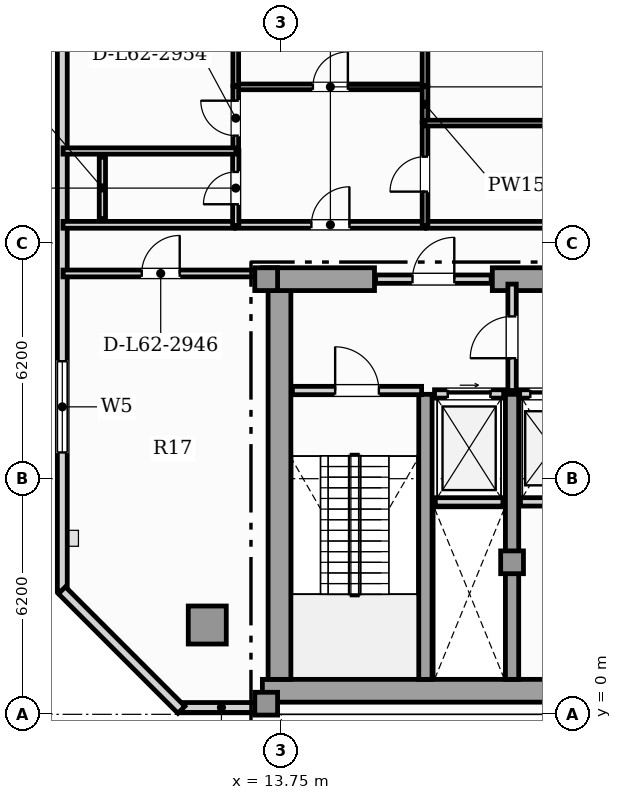
"""IFC4 building model, lengths in metres.
Left out: names, types, materials, properties, quantities, classifications, styles, units other than length and angle.
Written with IfcOpenShell. Run it as: python <this file> out.ifc"""

import sys

from ifc_helpers import new_model, si_unit, direction, frame, frame_2d, origin, origin_2d, place, context, subcontext, project, spatial, rectangle, hollow_rectangle, extrude, element, fill, save


model = new_model("IFC4")
c1 = context("Model", 3, precision=1e-05, world=origin(), true_north=direction((0.0, 1.0)))
c2 = subcontext(c1, "Body", "Model", "MODEL_VIEW")
j1 = project(units=[si_unit("LENGTHUNIT", "METRE"), si_unit("PLANEANGLEUNIT", "RADIAN")], contexts=[c1])
p1 = place(None, origin())
s1 = spatial("IfcSite", under=j1, at=p1, CompositionType="ELEMENT")
p2 = place(p1, origin())
s2 = spatial("IfcBuilding", under=s1, at=p2, CompositionType="ELEMENT")
p3 = place(p2, frame((0.0, 0.0, 251.7)))
s3 = spatial("IfcBuildingStorey", under=s2, at=p3, CompositionType="ELEMENT", Elevation=251.7)
p4 = place(p3, frame((13.25, 0.62, 0.0), z_axis=(0.0, 0.0, 1.0), x_axis=(1.0, 0.0, 0.0)))
e1 = element("IfcWall", 1, at=p4, inside=s3, PredefinedType="SHEAR", context=c2, shape_type="SweptSolid", body=[
    extrude(rectangle(XDim=31.0, YDim=0.6, at=frame_2d((15.5, 0.0))), origin(), (0.0, 0.0, 1.0), 4.85),
])
p5 = place(p3, frame((13.7, 0.92, 0.0), z_axis=(0.0, 0.0, 1.0), x_axis=(0.0, 1.0, 0.0)))
e2 = element("IfcWall", 2, at=p5, inside=s3, PredefinedType="SHEAR", context=c2, shape_type="SweptSolid", body=[
    extrude(rectangle(XDim=10.53, YDim=0.6, at=frame_2d((5.265, 0.0))), origin(), (0.0, 0.0, 1.0), 4.85),
])
p6 = place(p3, frame((13.25, 11.45, 0.0), z_axis=(0.0, 0.0, 1.0), x_axis=(1.0, 0.0, 0.0)))
e3 = element("IfcWall", 3, at=p6, inside=s3, PredefinedType="SHEAR", context=c2, shape_type="SweptSolid", body=[
    extrude(rectangle(XDim=2.95, YDim=0.6, at=frame_2d((1.475, 0.0))), origin(), (0.0, 0.0, 1.0), 4.85),
])
p7 = place(p3, frame((19.3, 11.45, 0.0), z_axis=(0.0, 0.0, 1.0), x_axis=(1.0, 0.0, 0.0)))
e4 = element("IfcWall", 4, at=p7, inside=s3, PredefinedType="SHEAR", context=c2, shape_type="SweptSolid", body=[
    extrude(rectangle(XDim=7.3, YDim=0.6, at=frame_2d((3.65, 0.0))), origin(), (0.0, 0.0, 1.0), 4.85),
])
for number, where, z_axis, x_axis in (
    (5, (17.54, 0.92, 0.0), (0.0, 0.0, 1.0), (0.0, 1.0, 0.0)),
    (6, (19.82, 0.92, 0.0), (0.0, 0.0, 1.0), (0.0, 1.0, 0.0)),
):
    element("IfcWall", number, at=place(p3, frame(where, z_axis=z_axis, x_axis=x_axis)), inside=s3, PredefinedType="SHEAR", context=c2, shape_type="SweptSolid", body=[
        extrude(rectangle(XDim=7.5, YDim=0.35, at=frame_2d((3.75, 0.0))), origin(), (0.0, 0.0, 1.0), 4.85),
    ])
for number, where, z_axis, x_axis in (
    (7, (13.35, 0.28, 0.0), (0.0, 0.0, 1.0), (1.0, 0.0, 0.0)),
    (8, (13.35, 11.45, 0.0), (0.0, 0.0, 1.0), (1.0, 0.0, 0.0)),
    (9, (19.82, 4.0, 0.0), (0.0, 0.0, 1.0), (1.0, 0.0, 0.0)),
):
    element("IfcColumn", number, at=place(p3, frame(where, z_axis=z_axis, x_axis=x_axis)), inside=s3, PredefinedType="COLUMN", context=c2, shape_type="SweptSolid", body=[
        extrude(rectangle(XDim=0.6, YDim=0.6, at=origin_2d()), origin(), (0.0, 0.0, 1.0), 5.05),
    ])
p8 = place(p3, frame((11.8, 2.35, 0.0), z_axis=(0.0, 0.0, 1.0), x_axis=(1.0, 0.0, 0.0)))
e10 = element("IfcColumn", 10, at=p8, inside=s3, PredefinedType="USERDEFINED", context=c2, shape_type="SweptSolid", body=[
    extrude(hollow_rectangle(XDim=1.0, YDim=1.0, WallThickness=0.06, at=origin_2d()), origin(), (0.0, 0.0, 1.0), 5.05),
])
p9 = place(p3, frame((11.095, 0.18, 0.0), z_axis=(0.0, 0.0, 1.0), x_axis=(1.0, 0.0, 0.0)))
e11 = element("IfcWall", 11, at=p9, inside=s3, PredefinedType="SOLIDWALL", context=c2, shape_type="SweptSolid", body=[
    extrude(rectangle(XDim=2.155, YDim=0.26, at=frame_2d((1.077, 0.0))), origin(), (0.0, 0.0, 1.0), 4.85),
])
p10 = place(p3, frame((7.986, 32.932, 0.0), z_axis=(0.0, 0.0, 1.0), x_axis=(0.0, -1.0, 0.0)))
e12 = element("IfcWall", 12, at=p10, inside=s3, PredefinedType="SOLIDWALL", context=c2, shape_type="SweptSolid", body=[
    extrude(rectangle(XDim=29.692, YDim=0.26, at=frame_2d((14.846, 0.0))), origin(), (0.0, 0.0, 1.0), 4.85),
])
p11 = place(p10, frame((23.642, 0.0, 0.85)))
e13 = element("IfcOpeningElement", 13, at=p11, cuts=e12, PredefinedType="OPENING", context=c2, shape_type="SweptSolid", body=[
    extrude(rectangle(XDim=2.4, YDim=2.0, at=frame_2d((1.2, 1.0))), frame((0.0, 0.14, 0.0), z_axis=(0.0, -1.0, 0.0), x_axis=(1.0, 0.0, 0.0)), (0.0, 0.0, 1.0), 0.28),
])
p12 = place(p10, frame((4.732, 0.0, 0.95)))
e14 = element("IfcOpeningElement", 14, at=p12, cuts=e12, PredefinedType="OPENING", context=c2, shape_type="SweptSolid", body=[
    extrude(rectangle(XDim=0.9, YDim=1.5, at=frame_2d((0.45, 0.75))), frame((0.0, 0.14, 0.0), z_axis=(0.0, -1.0, 0.0), x_axis=(1.0, 0.0, 0.0)), (0.0, 0.0, 1.0), 0.28),
])
p13 = place(p10, frame((11.271, 0.0, 0.9)))
e15 = element("IfcOpeningElement", 15, at=p13, cuts=e12, PredefinedType="OPENING", context=c2, shape_type="SweptSolid", body=[
    extrude(rectangle(XDim=1.5, YDim=1.95, at=frame_2d((0.75, 0.975))), frame((0.0, 0.14, 0.0), z_axis=(0.0, -1.0, 0.0), x_axis=(1.0, 0.0, 0.0)), (0.0, 0.0, 1.0), 0.28),
])
p14 = place(p3, frame((7.976, 3.264, 0.0), z_axis=(0.0, 0.0, 1.0), x_axis=(0.707106781187, -0.707106781187, 0.0)))
e16 = element("IfcWall", 16, at=p14, inside=s3, PredefinedType="SOLIDWALL", context=c2, shape_type="SweptSolid", body=[
    extrude(rectangle(XDim=4.446, YDim=0.26, at=frame_2d((2.223, 0.0))), origin(), (0.0, 0.0, 1.0), 4.85),
])
p15 = place(p3, frame((17.8, 5.59, 0.0), z_axis=(0.0, 0.0, 1.0), x_axis=(1.0, 0.0, 0.0)))
e17 = element("IfcWall", 17, at=p15, inside=s3, PredefinedType="SOLIDWALL", context=c2, shape_type="SweptSolid", body=[
    extrude(rectangle(XDim=1.78, YDim=0.22, at=frame_2d((0.89, 0.0))), origin(), (0.0, 0.0, 1.0), 4.85),
])
p16 = place(p3, frame((17.78, 8.43, 0.0), z_axis=(0.0, 0.0, 1.0), x_axis=(1.0, 0.0, 0.0)))
e18 = element("IfcWall", 18, at=p16, inside=s3, PredefinedType="SOLIDWALL", context=c2, shape_type="SweptSolid", body=[
    extrude(rectangle(XDim=1.82, YDim=0.22, at=frame_2d((0.91, 0.0))), origin(), (0.0, 0.0, 1.0), 4.85),
])
p17 = place(p16, frame((0.35, 0.0, 0.0)))
e19 = element("IfcOpeningElement", 19, at=p17, cuts=e18, PredefinedType="OPENING", context=c2, shape_type="SweptSolid", body=[
    extrude(rectangle(XDim=1.12, YDim=2.25, at=frame_2d((0.56, 1.125))), frame((0.0, 0.12, 0.0), z_axis=(0.0, -1.0, 0.0), x_axis=(1.0, 0.0, 0.0)), (0.0, 0.0, 1.0), 0.24),
])
p18 = place(p3, frame((20.04, 5.59, 0.0), z_axis=(0.0, 0.0, 1.0), x_axis=(1.0, 0.0, 0.0)))
e20 = element("IfcWall", 20, at=p18, inside=s3, PredefinedType="SOLIDWALL", context=c2, shape_type="SweptSolid", body=[
    extrude(rectangle(XDim=1.7, YDim=0.22, at=frame_2d((0.85, 0.0))), origin(), (0.0, 0.0, 1.0), 4.85),
])
p19 = place(p3, frame((20.02, 8.43, 0.0), z_axis=(0.0, 0.0, 1.0), x_axis=(1.0, 0.0, 0.0)))
e21 = element("IfcWall", 21, at=p19, inside=s3, PredefinedType="SOLIDWALL", context=c2, shape_type="SweptSolid", body=[
    extrude(rectangle(XDim=1.74, YDim=0.22, at=frame_2d((0.87, 0.0))), origin(), (0.0, 0.0, 1.0), 4.85),
])
p20 = place(p19, frame((0.28, 0.0, 0.0)))
e22 = element("IfcOpeningElement", 22, at=p20, cuts=e21, PredefinedType="OPENING", context=c2, shape_type="SweptSolid", body=[
    extrude(rectangle(XDim=1.18, YDim=2.2, at=frame_2d((0.59, 1.1))), frame((0.0, 0.12, 0.0), z_axis=(0.0, -1.0, 0.0), x_axis=(1.0, 0.0, 0.0)), (0.0, 0.0, 1.0), 0.24),
])
p21 = place(p3, frame((14.04, 8.52, 0.0), z_axis=(0.0, 0.0, 1.0), x_axis=(1.0, 0.0, 0.0)))
e23 = element("IfcWall", 23, at=p21, inside=s3, PredefinedType="SOLIDWALL", context=c2, shape_type="SweptSolid", body=[
    extrude(rectangle(XDim=3.4, YDim=0.22, at=frame_2d((1.7, 0.0))), origin(), (0.0, 0.0, 1.0), 4.85),
])
p22 = place(p21, frame((1.125, 0.0, 0.0)))
e24 = element("IfcOpeningElement", 24, at=p22, cuts=e23, PredefinedType="OPENING", context=c2, shape_type="SweptSolid", body=[
    extrude(rectangle(XDim=1.15, YDim=2.2, at=frame_2d((0.575, 1.1))), frame((0.0, 0.12, 0.0), z_axis=(0.0, -1.0, 0.0), x_axis=(1.0, 0.0, 0.0)), (0.0, 0.0, 1.0), 0.24),
])
p23 = place(p3, frame((19.82, 8.52, 0.0), z_axis=(0.0, 0.0, 1.0), x_axis=(0.0, 1.0, 0.0)))
e25 = element("IfcWall", 25, at=p23, inside=s3, PredefinedType="SOLIDWALL", context=c2, shape_type="SweptSolid", body=[
    extrude(rectangle(XDim=2.8, YDim=0.22, at=frame_2d((1.4, 0.0))), origin(), (0.0, 0.0, 1.0), 4.306),
])
p24 = place(p23, frame((0.85, 0.0, 0.0)))
e26 = element("IfcOpeningElement", 26, at=p24, cuts=e25, PredefinedType="OPENING", context=c2, shape_type="SweptSolid", body=[
    extrude(rectangle(XDim=1.1, YDim=2.2, at=frame_2d((0.55, 1.1))), frame((0.0, 0.12, 0.0), z_axis=(0.0, -1.0, 0.0), x_axis=(1.0, 0.0, 0.0)), (0.0, 0.0, 1.0), 0.24),
])
p25 = place(p3, frame((16.23, 11.45, 0.0), z_axis=(0.0, 0.0, 1.0), x_axis=(1.0, 0.0, 0.0)))
e27 = element("IfcWall", 27, at=p25, inside=s3, PredefinedType="SOLIDWALL", context=c2, shape_type="SweptSolid", body=[
    extrude(rectangle(XDim=3.04, YDim=0.22, at=frame_2d((1.52, 0.0))), origin(), (0.0, 0.0, 1.0), 4.85),
])
p26 = place(p25, frame((0.97, 0.0, 0.0)))
e28 = element("IfcOpeningElement", 28, at=p26, cuts=e27, PredefinedType="OPENING", context=c2, shape_type="SweptSolid", body=[
    extrude(rectangle(XDim=1.1, YDim=2.2, at=frame_2d((0.55, 1.1))), frame((0.0, 0.12, 0.0), z_axis=(0.0, -1.0, 0.0), x_axis=(1.0, 0.0, 0.0)), (0.0, 0.0, 1.0), 0.24),
])
p27 = place(p3, frame((8.005, 11.6, 0.0), z_axis=(0.0, 0.0, 1.0), x_axis=(1.0, 0.0, 0.0)))
e29 = element("IfcWall", 29, at=p27, inside=s3, PredefinedType="PARTITIONING", context=c2, shape_type="SweptSolid", body=[
    extrude(rectangle(XDim=5.14, YDim=0.18, at=frame_2d((2.57, 0.0))), origin(), (0.0, 0.0, 1.0), 4.85),
])
p28 = place(p27, frame((2.07, 0.0, 0.0)))
e30 = element("IfcOpeningElement", 30, at=p28, cuts=e29, PredefinedType="OPENING", context=c2, shape_type="SweptSolid", body=[
    extrude(rectangle(XDim=1.0, YDim=2.15, at=frame_2d((0.5, 1.075))), frame((0.0, 0.1, 0.0), z_axis=(0.0, -1.0, 0.0), x_axis=(1.0, 0.0, 0.0)), (0.0, 0.0, 1.0), 0.2),
])
p29 = place(p3, frame((12.545, 12.88, 0.0), z_axis=(0.0, 0.0, 1.0), x_axis=(1.0, 0.0, 0.0)))
e31 = element("IfcWall", 31, at=p29, inside=s3, PredefinedType="PARTITIONING", context=c2, shape_type="SweptSolid", body=[
    extrude(rectangle(XDim=4.99, YDim=0.18, at=frame_2d((2.495, 0.0))), origin(), (0.0, 0.0, 1.0), 4.85),
])
p30 = place(p29, frame((1.995, 0.0, 0.0)))
e32 = element("IfcOpeningElement", 32, at=p30, cuts=e31, PredefinedType="OPENING", context=c2, shape_type="SweptSolid", body=[
    extrude(rectangle(XDim=1.0, YDim=2.15, at=frame_2d((0.5, 1.075))), frame((0.0, 0.1, 0.0), z_axis=(0.0, -1.0, 0.0), x_axis=(1.0, 0.0, 0.0)), (0.0, 0.0, 1.0), 0.2),
])
p31 = place(p3, frame((8.005, 12.88, 0.0), z_axis=(0.0, 0.0, 1.0), x_axis=(1.0, 0.0, 0.0)))
e33 = element("IfcWall", 33, at=p31, inside=s3, PredefinedType="PARTITIONING", context=c2, shape_type="SweptSolid", body=[
    extrude(rectangle(XDim=4.51, YDim=0.18, at=frame_2d((2.255, 0.0))), origin(), (0.0, 0.0, 1.0), 4.85),
])
p32 = place(p3, frame((17.565, 12.88, 0.0), z_axis=(0.0, 0.0, 1.0), x_axis=(1.0, 0.0, 0.0)))
e34 = element("IfcWall", 34, at=p32, inside=s3, PredefinedType="PARTITIONING", context=c2, shape_type="SweptSolid", body=[
    extrude(rectangle(XDim=3.94, YDim=0.18, at=frame_2d((1.97, 0.0))), origin(), (0.0, 0.0, 1.0), 4.85),
])
p33 = place(p3, frame((12.545, 16.51, 0.0), z_axis=(0.0, 0.0, 1.0), x_axis=(1.0, 0.0, 0.0)))
e35 = element("IfcWall", 35, at=p33, inside=s3, PredefinedType="PARTITIONING", context=c2, shape_type="SweptSolid", body=[
    extrude(rectangle(XDim=4.99, YDim=0.15, at=frame_2d((2.495, 0.0))), origin(), (0.0, 0.0, 1.0), 4.85),
])
p34 = place(p33, frame((2.035, 0.0, 0.0)))
e36 = element("IfcOpeningElement", 36, at=p34, cuts=e35, PredefinedType="OPENING", context=c2, shape_type="SweptSolid", body=[
    extrude(rectangle(XDim=0.92, YDim=2.1, at=frame_2d((0.46, 1.05))), frame((0.0, 0.085, 0.0), z_axis=(0.0, -1.0, 0.0), x_axis=(1.0, 0.0, 0.0)), (0.0, 0.0, 1.0), 0.17),
])
p35 = place(p3, frame((12.55, 12.865, 0.0), z_axis=(0.0, 0.0, 1.0), x_axis=(0.0, 1.0, 0.0)))
e37 = element("IfcWall", 37, at=p35, inside=s3, PredefinedType="PLUMBINGWALL", context=c2, shape_type="SweptSolid", body=[
    extrude(rectangle(XDim=1.962, YDim=0.165, at=frame_2d((0.981, 0.0))), origin(), (0.0, 0.0, 1.0), 4.85),
])
p36 = place(p35, frame((0.556, 0.0, 0.0)))
e38 = element("IfcOpeningElement", 38, at=p36, cuts=e37, PredefinedType="OPENING", context=c2, shape_type="SweptSolid", body=[
    extrude(rectangle(XDim=0.85, YDim=2.1, at=frame_2d((0.425, 1.05))), frame((0.0, 0.093, 0.0), z_axis=(0.0, -1.0, 0.0), x_axis=(1.0, 0.0, 0.0)), (0.0, 0.0, 1.0), 0.185),
])
p37 = place(p3, frame((12.55, 14.857, 0.0), z_axis=(0.0, 0.0, 1.0), x_axis=(0.0, 1.0, 0.0)))
e39 = element("IfcWall", 39, at=p37, inside=s3, PredefinedType="PARTITIONING", context=c2, shape_type="SweptSolid", body=[
    extrude(rectangle(XDim=1.658, YDim=0.15, at=frame_2d((0.829, 0.0))), origin(), (0.0, 0.0, 1.0), 4.85),
])
p38 = place(p37, frame((0.369, 0.0, 0.0)))
e40 = element("IfcOpeningElement", 40, at=p38, cuts=e39, PredefinedType="OPENING", context=c2, shape_type="SweptSolid", body=[
    extrude(rectangle(XDim=0.92, YDim=2.1, at=frame_2d((0.46, 1.05))), frame((0.0, 0.085, 0.0), z_axis=(0.0, -1.0, 0.0), x_axis=(1.0, 0.0, 0.0)), (0.0, 0.0, 1.0), 0.17),
])
p39 = place(p3, frame((17.53, 12.865, 0.0), z_axis=(0.0, 0.0, 1.0), x_axis=(0.0, 1.0, 0.0)))
e41 = element("IfcWall", 41, at=p39, inside=s3, PredefinedType="PARTITIONING", context=c2, shape_type="SweptSolid", body=[
    extrude(rectangle(XDim=2.697, YDim=0.15, at=frame_2d((1.348, 0.0))), origin(), (0.0, 0.0, 1.0), 4.85),
])
p40 = place(p39, frame((0.888, 0.0, 0.0)))
e42 = element("IfcOpeningElement", 42, at=p40, cuts=e41, PredefinedType="OPENING", context=c2, shape_type="SweptSolid", body=[
    extrude(rectangle(XDim=0.92, YDim=2.1, at=frame_2d((0.46, 1.05))), frame((0.0, 0.085, 0.0), z_axis=(0.0, -1.0, 0.0), x_axis=(1.0, 0.0, 0.0)), (0.0, 0.0, 1.0), 0.17),
])
p41 = place(p3, frame((17.53, 15.592, 0.0), z_axis=(0.0, 0.0, 1.0), x_axis=(0.0, 1.0, 0.0)))
e43 = element("IfcWall", 43, at=p41, inside=s3, PredefinedType="PARTITIONING", context=c2, shape_type="SweptSolid", body=[
    extrude(rectangle(XDim=0.923, YDim=0.15, at=frame_2d((0.462, 0.0))), origin(), (0.0, 0.0, 1.0), 4.85),
])
p42 = place(p3, frame((12.55, 16.545, 0.0), z_axis=(0.0, 0.0, 1.0), x_axis=(0.0, 1.0, 0.0)))
e44 = element("IfcWall", 44, at=p42, inside=s3, PredefinedType="PARTITIONING", context=c2, shape_type="SweptSolid", body=[
    extrude(rectangle(XDim=10.46, YDim=0.15, at=frame_2d((5.23, 0.0))), origin(), (0.0, 0.0, 1.0), 4.85),
])
p43 = place(p42, frame((4.77, 0.0, 0.0)))
e45 = element("IfcOpeningElement", 45, at=p43, cuts=e44, PredefinedType="OPENING", context=c2, shape_type="SweptSolid", body=[
    extrude(rectangle(XDim=0.92, YDim=2.1, at=frame_2d((0.46, 1.05))), frame((0.0, 0.085, 0.0), z_axis=(0.0, -1.0, 0.0), x_axis=(1.0, 0.0, 0.0)), (0.0, 0.0, 1.0), 0.17),
])
p44 = place(p3, frame((17.53, 16.545, 0.0), z_axis=(0.0, 0.0, 1.0), x_axis=(0.0, 1.0, 0.0)))
e46 = element("IfcWall", 46, at=p44, inside=s3, PredefinedType="PARTITIONING", context=c2, shape_type="SweptSolid", body=[
    extrude(rectangle(XDim=10.46, YDim=0.15, at=frame_2d((5.23, 0.0))), origin(), (0.0, 0.0, 1.0), 4.85),
])
p45 = place(p44, frame((4.77, 0.0, 0.0)))
e47 = element("IfcOpeningElement", 47, at=p45, cuts=e46, PredefinedType="OPENING", context=c2, shape_type="SweptSolid", body=[
    extrude(rectangle(XDim=0.92, YDim=2.1, at=frame_2d((0.46, 1.05))), frame((0.0, 0.085, 0.0), z_axis=(0.0, -1.0, 0.0), x_axis=(1.0, 0.0, 0.0)), (0.0, 0.0, 1.0), 0.17),
])
p46 = place(p3, frame((8.005, 14.822, 0.0), z_axis=(0.0, 0.0, 1.0), x_axis=(1.0, 0.0, 0.0)))
e48 = element("IfcWall", 48, at=p46, inside=s3, PredefinedType="PLUMBINGWALL", context=c2, shape_type="SweptSolid", body=[
    extrude(rectangle(XDim=4.55, YDim=0.165, at=frame_2d((2.275, 0.0))), origin(), (0.0, 0.0, 1.0), 4.85),
])
p47 = place(p3, frame((17.525, 15.556, 0.0), z_axis=(0.0, 0.0, 1.0), x_axis=(1.0, 0.0, 0.0)))
e49 = element("IfcWall", 49, at=p47, inside=s3, PredefinedType="PARTITIONING", context=c2, shape_type="SweptSolid", body=[
    extrude(rectangle(XDim=4.02, YDim=0.15, at=frame_2d((2.01, 0.0))), origin(), (0.0, 0.0, 1.0), 4.85),
])
p48 = place(p3, frame((9.04, 13.045, 0.0), z_axis=(0.0, 0.0, 1.0), x_axis=(0.0, 1.0, 0.0)))
e50 = element("IfcWall", 50, at=p48, inside=s3, PredefinedType="PLUMBINGWALL", context=c2, shape_type="SweptSolid", body=[
    extrude(rectangle(XDim=1.612, YDim=0.165, at=frame_2d((0.806, 0.0))), origin(), (0.0, 0.0, 1.0), 4.85),
])
p49 = place(p11, origin())
e51 = element("IfcWindow", 51, at=p49, inside=s3, PartitioningType="SINGLE_PANEL", PredefinedType="WINDOW", context=c2, shape_type="SweptSolid", body=[
    extrude(rectangle(XDim=2.4, YDim=2.0, at=frame_2d((1.2, 1.0))), frame((0.0, 0.03, 0.0), z_axis=(0.0, -1.0, 0.0), x_axis=(1.0, 0.0, 0.0)), (0.0, 0.0, 1.0), 0.06),
])
fill(e13, e51)
p50 = place(p17, origin())
e52 = element("IfcDoor", 52, at=p50, inside=s3, OperationType="SLIDING_TO_RIGHT", PredefinedType="DOOR", context=c2, shape_type="SweptSolid", body=[
    extrude(rectangle(XDim=1.12, YDim=2.25, at=frame_2d((0.56, 1.125))), frame((0.0, 0.025, 0.0), z_axis=(0.0, -1.0, 0.0), x_axis=(1.0, 0.0, 0.0)), (0.0, 0.0, 1.0), 0.05),
])
fill(e19, e52)
p51 = place(p20, origin())
e53 = element("IfcDoor", 53, at=p51, inside=s3, OperationType="SLIDING_TO_LEFT", PredefinedType="DOOR", context=c2, shape_type="SweptSolid", body=[
    extrude(rectangle(XDim=1.18, YDim=2.2, at=frame_2d((0.59, 1.1))), frame((0.0, 0.025, 0.0), z_axis=(0.0, -1.0, 0.0), x_axis=(1.0, 0.0, 0.0)), (0.0, 0.0, 1.0), 0.05),
])
fill(e22, e53)
p52 = place(p22, origin())
e54 = element("IfcDoor", 54, at=p52, inside=s3, OperationType="SINGLE_SWING_LEFT", PredefinedType="DOOR", context=c2, shape_type="SweptSolid", body=[
    extrude(rectangle(XDim=1.15, YDim=2.2, at=frame_2d((0.575, 1.1))), frame((0.0, 0.025, 0.0), z_axis=(0.0, -1.0, 0.0), x_axis=(1.0, 0.0, 0.0)), (0.0, 0.0, 1.0), 0.05),
])
fill(e24, e54)
p53 = place(p24, origin())
e55 = element("IfcDoor", 55, at=p53, inside=s3, OperationType="SINGLE_SWING_LEFT", PredefinedType="DOOR", context=c2, shape_type="SweptSolid", body=[
    extrude(rectangle(XDim=1.1, YDim=2.2, at=frame_2d((0.55, 1.1))), frame((0.0, 0.025, 0.0), z_axis=(0.0, -1.0, 0.0), x_axis=(1.0, 0.0, 0.0)), (0.0, 0.0, 1.0), 0.05),
])
fill(e26, e55)
p54 = place(p26, origin())
e56 = element("IfcDoor", 56, at=p54, inside=s3, OperationType="SINGLE_SWING_RIGHT", PredefinedType="DOOR", context=c2, shape_type="SweptSolid", body=[
    extrude(rectangle(XDim=1.1, YDim=2.2, at=frame_2d((0.55, 1.1))), frame((0.0, 0.025, 0.0), z_axis=(0.0, -1.0, 0.0), x_axis=(1.0, 0.0, 0.0)), (0.0, 0.0, 1.0), 0.05),
])
fill(e28, e56)
p55 = place(p28, origin())
e57 = element("IfcDoor", 57, at=p55, inside=s3, OperationType="SINGLE_SWING_RIGHT", PredefinedType="DOOR", context=c2, shape_type="SweptSolid", body=[
    extrude(rectangle(XDim=1.0, YDim=2.15, at=frame_2d((0.5, 1.075))), frame((0.0, 0.025, 0.0), z_axis=(0.0, -1.0, 0.0), x_axis=(1.0, 0.0, 0.0)), (0.0, 0.0, 1.0), 0.05),
])
fill(e30, e57)
p56 = place(p30, origin())
e58 = element("IfcDoor", 58, at=p56, inside=s3, OperationType="SINGLE_SWING_RIGHT", PredefinedType="DOOR", context=c2, shape_type="SweptSolid", body=[
    extrude(rectangle(XDim=1.0, YDim=2.15, at=frame_2d((0.5, 1.075))), frame((0.0, 0.025, 0.0), z_axis=(0.0, -1.0, 0.0), x_axis=(1.0, 0.0, 0.0)), (0.0, 0.0, 1.0), 0.05),
])
fill(e32, e58)
p57 = place(p34, origin())
e59 = element("IfcDoor", 59, at=p57, inside=s3, OperationType="SINGLE_SWING_RIGHT", PredefinedType="DOOR", context=c2, shape_type="SweptSolid", body=[
    extrude(rectangle(XDim=0.92, YDim=2.1, at=frame_2d((0.46, 1.05))), frame((0.0, 0.025, 0.0), z_axis=(0.0, -1.0, 0.0), x_axis=(1.0, 0.0, 0.0)), (0.0, 0.0, 1.0), 0.05),
])
fill(e36, e59)
p58 = place(p36, origin())
e60 = element("IfcDoor", 60, at=p58, inside=s3, OperationType="SINGLE_SWING_LEFT", PredefinedType="DOOR", context=c2, shape_type="SweptSolid", body=[
    extrude(rectangle(XDim=0.85, YDim=2.1, at=frame_2d((0.425, 1.05))), frame((0.0, 0.025, 0.0), z_axis=(0.0, -1.0, 0.0), x_axis=(1.0, 0.0, 0.0)), (0.0, 0.0, 1.0), 0.05),
])
fill(e38, e60)
p59 = place(p38, origin())
e61 = element("IfcDoor", 61, at=p59, inside=s3, OperationType="SINGLE_SWING_RIGHT", PredefinedType="DOOR", context=c2, shape_type="SweptSolid", body=[
    extrude(rectangle(XDim=0.92, YDim=2.1, at=frame_2d((0.46, 1.05))), frame((0.0, 0.025, 0.0), z_axis=(0.0, -1.0, 0.0), x_axis=(1.0, 0.0, 0.0)), (0.0, 0.0, 1.0), 0.05),
])
fill(e40, e61)
p60 = place(p40, origin())
e62 = element("IfcDoor", 62, at=p60, inside=s3, OperationType="SINGLE_SWING_LEFT", PredefinedType="DOOR", context=c2, shape_type="SweptSolid", body=[
    extrude(rectangle(XDim=0.92, YDim=2.1, at=frame_2d((0.46, 1.05))), frame((0.0, 0.025, 0.0), z_axis=(0.0, -1.0, 0.0), x_axis=(1.0, 0.0, 0.0)), (0.0, 0.0, 1.0), 0.05),
])
fill(e42, e62)
save(model, sys.argv[1])
